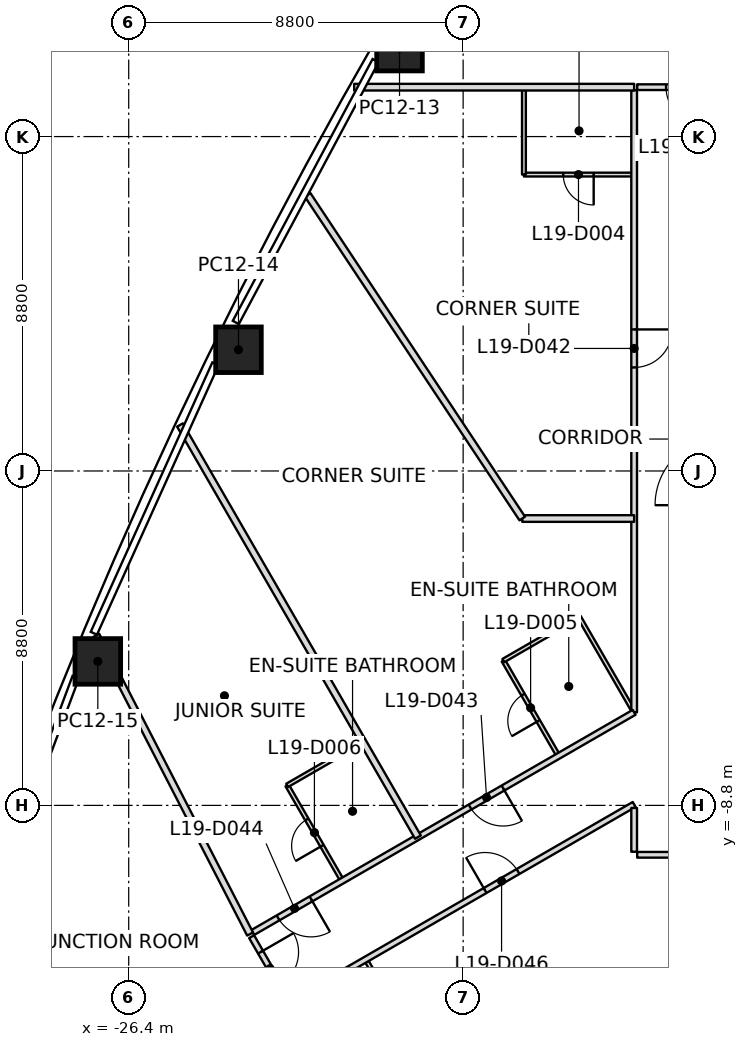
"""IFC4 building model, lengths in metres.
Left out: names, types, materials, properties, quantities, classifications, styles, units other than length and angle.
Written with IfcOpenShell. Run it as: python <this file> out.ifc"""

import sys

from ifc_helpers import new_model, si_unit, direction, frame, frame_2d, origin, origin_2d, place, context, subcontext, project, spatial, rectangle, extrude, element, fill, save


model = new_model("IFC4")
c1 = context("Model", 3, precision=1e-05, world=origin(), true_north=direction((0.0, 1.0)))
c2 = subcontext(c1, "Body", "Model", "MODEL_VIEW")
j1 = project(units=[si_unit("LENGTHUNIT", "METRE"), si_unit("PLANEANGLEUNIT", "RADIAN")], contexts=[c1])
p1 = place(None, origin())
s1 = spatial("IfcSite", under=j1, at=p1, CompositionType="ELEMENT")
p2 = place(p1, origin())
s2 = spatial("IfcBuilding", under=s1, at=p2, CompositionType="ELEMENT")
p3 = place(p2, frame((0.0, 0.0, 92.4)))
s3 = spatial("IfcBuildingStorey", under=s2, at=p3, CompositionType="ELEMENT", Elevation=92.4)
p4 = place(p3, frame((-19.274, 11.128, 0.0), z_axis=(0.010688020009, -0.006201690622, 0.999923649716), x_axis=(0.499971440741, 0.866041891424, 2.7221193e-05)))
e1 = element("IfcColumn", 1, at=p4, inside=s3, PredefinedType="COLUMN", context=c2, shape_type="SweptSolid", body=[
    extrude(rectangle(XDim=1.2, YDim=1.2, at=origin_2d()), origin(), (0.0, 0.0, 1.0), 3.7),
])
p5 = place(p3, frame((-23.512, 3.19, 0.0), z_axis=(0.015305637388, 0.002243067548, 0.999880345898), x_axis=(0.441317903512, 0.897307986586, -0.008768423407)))
e2 = element("IfcColumn", 2, at=p5, inside=s3, PredefinedType="COLUMN", context=c2, shape_type="SweptSolid", body=[
    extrude(rectangle(XDim=1.2, YDim=1.2, at=origin_2d()), origin(), (0.0, 0.0, 1.0), 3.701),
])
p6 = place(p3, frame((-27.212, -5.011, 0.0), z_axis=(0.019393432612, 0.011015997436, 0.999751240345), x_axis=(0.380717970692, 0.924524223098, -0.017572356073)))
e3 = element("IfcColumn", 3, at=p6, inside=s3, PredefinedType="COLUMN", context=c2, shape_type="SweptSolid", body=[
    extrude(rectangle(XDim=1.2, YDim=1.2, at=origin_2d()), origin(), (0.0, 0.0, 1.0), 3.701),
])
p7 = place(p3, frame((-23.206, -12.185, 0.0), z_axis=(0.0, 0.0, 1.0), x_axis=(-0.457776028904, 0.88906754938, 0.0)))
e4 = element("IfcWall", 4, at=p7, inside=s3, PredefinedType="PARTITIONING", context=c2, shape_type="SweptSolid", body=[
    extrude(rectangle(XDim=8.84, YDim=0.175, at=frame_2d((4.42, 0.0))), origin(), (0.0, 0.0, 1.0), 3.15),
])
p8 = place(p3, frame((-18.789, -9.635, 0.0), z_axis=(0.0, 0.0, 1.0), x_axis=(-0.500005395086, 0.866022288908, 0.0)))
e5 = element("IfcWall", 5, at=p8, inside=s3, PredefinedType="PARTITIONING", context=c2, shape_type="SweptSolid", body=[
    extrude(rectangle(XDim=12.523, YDim=0.175, at=frame_2d((6.262, 0.0))), origin(), (0.0, 0.0, 1.0), 2.934),
])
p9 = place(p3, frame((-13.1, -1.251, 0.0), z_axis=(0.0, 0.0, 1.0), x_axis=(-1.0, 0.0, 0.0)))
e6 = element("IfcWall", 6, at=p9, inside=s3, PredefinedType="PARTITIONING", context=c2, shape_type="SweptSolid", body=[
    extrude(rectangle(XDim=2.944, YDim=0.175, at=frame_2d((1.472, 0.0))), origin(), (0.0, 0.0, 1.0), 3.15),
])
p10 = place(p3, frame((-16.044, -1.251, 0.0), z_axis=(0.0, 0.0, 1.0), x_axis=(-0.552647734039, 0.833414951907, 0.0)))
e7 = element("IfcWall", 7, at=p10, inside=s3, PredefinedType="PARTITIONING", context=c2, shape_type="SweptSolid", body=[
    extrude(rectangle(XDim=10.22, YDim=0.175, at=frame_2d((5.11, 0.0))), origin(), (0.0, 0.0, 1.0), 2.934),
])
p11 = place(p3, frame((-13.1, 10.1, 0.0), z_axis=(0.0, 0.0, 1.0), x_axis=(-1.0, 0.0, 0.0)))
e8 = element("IfcWall", 8, at=p11, inside=s3, PredefinedType="PARTITIONING", context=c2, shape_type="SweptSolid", body=[
    extrude(rectangle(XDim=7.367, YDim=0.175, at=frame_2d((3.684, 0.0))), origin(), (0.0, 0.0, 1.0), 2.934),
])
p12 = place(p3, frame((-23.166, -12.255, 0.0), z_axis=(0.0, 0.0, 1.0), x_axis=(0.499969367985, -0.866043088465, 0.0)))
e9 = element("IfcWall", 9, at=p12, inside=s3, PredefinedType="PARTITIONING", context=c2, shape_type="SweptSolid", body=[
    extrude(rectangle(XDim=1.94, YDim=0.15, at=frame_2d((0.97, 0.0))), origin(), (0.0, 0.0, 1.0), 2.797),
])
p13 = place(p12, frame((0.47, 0.0, 0.0)))
e10 = element("IfcOpeningElement", 10, at=p13, cuts=e9, PredefinedType="OPENING", context=c2, shape_type="SweptSolid", body=[
    extrude(rectangle(XDim=1.0, YDim=2.1, at=frame_2d((0.5, 1.05))), frame((0.0, 0.075, 0.0), z_axis=(0.0, -1.0, 0.0), x_axis=(1.0, 0.0, 0.0)), (0.0, 0.0, 1.0), 0.15),
])
p14 = place(p3, frame((-13.1, 10.02, 0.0), z_axis=(0.0, 0.0, 1.0), x_axis=(0.0, -1.0, 0.0)))
e11 = element("IfcWall", 11, at=p14, inside=s3, PredefinedType="PARTITIONING", context=c2, shape_type="SweptSolid", body=[
    extrude(rectangle(XDim=16.371, YDim=0.15, at=frame_2d((8.186, 0.0))), origin(), (0.0, 0.0, 1.0), 2.947),
])
p15 = place(p14, frame((6.295, 0.0, 0.0)))
e12 = element("IfcOpeningElement", 12, at=p15, cuts=e11, PredefinedType="OPENING", context=c2, shape_type="SweptSolid", body=[
    extrude(rectangle(XDim=1.0, YDim=2.1, at=frame_2d((0.5, 1.05))), frame((0.0, 0.075, 0.0), z_axis=(0.0, -1.0, 0.0), x_axis=(1.0, 0.0, 0.0)), (0.0, 0.0, 1.0), 0.15),
])
p16 = place(p3, frame((-13.1, -6.351, 0.0), z_axis=(0.0, 0.0, 1.0), x_axis=(-0.866028069402, -0.499995382986, 0.0)))
e13 = element("IfcWall", 13, at=p16, inside=s3, PredefinedType="PARTITIONING", context=c2, shape_type="SweptSolid", body=[
    extrude(rectangle(XDim=11.589, YDim=0.15, at=frame_2d((5.794, 0.0))), origin(), (0.0, 0.0, 1.0), 2.947),
])
p17 = place(p16, frame((3.985, 0.0, 0.0)))
e14 = element("IfcOpeningElement", 14, at=p17, cuts=e13, PredefinedType="OPENING", context=c2, shape_type="SweptSolid", body=[
    extrude(rectangle(XDim=1.0, YDim=2.1, at=frame_2d((0.5, 1.05))), frame((0.0, 0.075, 0.0), z_axis=(0.0, -1.0, 0.0), x_axis=(1.0, 0.0, 0.0)), (0.0, 0.0, 1.0), 0.15),
])
p18 = place(p16, frame((9.819, 0.0, 0.0)))
e15 = element("IfcOpeningElement", 15, at=p18, cuts=e13, PredefinedType="OPENING", context=c2, shape_type="SweptSolid", body=[
    extrude(rectangle(XDim=1.0, YDim=2.1, at=frame_2d((0.5, 1.05))), frame((0.0, 0.075, 0.0), z_axis=(0.0, -1.0, 0.0), x_axis=(1.0, 0.0, 0.0)), (0.0, 0.0, 1.0), 0.15),
])
p19 = place(p3, frame((-22.086, -13.964, 0.0), z_axis=(0.0, 0.0, 1.0), x_axis=(0.866016323255, 0.500015727609, 0.0)))
e16 = element("IfcWall", 16, at=p19, inside=s3, PredefinedType="PARTITIONING", context=c2, shape_type="SweptSolid", body=[
    extrude(rectangle(XDim=10.377, YDim=0.15, at=frame_2d((5.188, 0.0))), origin(), (0.0, 0.0, 1.0), 2.797),
])
p20 = place(p19, frame((5.848, 0.0, 0.0)))
e17 = element("IfcOpeningElement", 17, at=p20, cuts=e16, PredefinedType="OPENING", context=c2, shape_type="SweptSolid", body=[
    extrude(rectangle(XDim=1.0, YDim=2.1, at=frame_2d((0.5, 1.05))), frame((0.0, 0.075, 0.0), z_axis=(0.0, -1.0, 0.0), x_axis=(1.0, 0.0, 0.0)), (0.0, 0.0, 1.0), 0.15),
])
p21 = place(p3, frame((-13.1, -8.867, 0.0), z_axis=(0.0, 0.0, 1.0), x_axis=(0.0, -1.0, 0.0)))
e18 = element("IfcWall", 18, at=p21, inside=s3, PredefinedType="PARTITIONING", context=c2, shape_type="SweptSolid", body=[
    extrude(rectangle(XDim=1.153, YDim=0.15, at=frame_2d((0.576, 0.0))), origin(), (0.0, 0.0, 1.0), 2.797),
])
p22 = place(p3, frame((-13.02, -10.1, 0.0), z_axis=(0.0, 0.0, 1.0), x_axis=(1.0, 0.0, 0.0)))
e19 = element("IfcWall", 19, at=p22, inside=s3, PredefinedType="PARTITIONING", context=c2, shape_type="SweptSolid", body=[
    extrude(rectangle(XDim=26.04, YDim=0.15, at=frame_2d((13.02, 0.0))), origin(), (0.0, 0.0, 1.0), 2.947),
])
p23 = place(p22, frame((5.37, 0.0, 0.0)))
e20 = element("IfcOpeningElement", 20, at=p23, cuts=e19, PredefinedType="OPENING", context=c2, shape_type="SweptSolid", body=[
    extrude(rectangle(XDim=1.0, YDim=2.1, at=frame_2d((0.5, 1.05))), frame((0.0, 0.075, 0.0), z_axis=(0.0, -1.0, 0.0), x_axis=(1.0, 0.0, 0.0)), (0.0, 0.0, 1.0), 0.15),
])
p24 = place(p22, frame((10.17, 0.0, 0.0)))
e21 = element("IfcOpeningElement", 21, at=p24, cuts=e19, PredefinedType="OPENING", context=c2, shape_type="SweptSolid", body=[
    extrude(rectangle(XDim=1.0, YDim=2.1, at=frame_2d((0.5, 1.05))), frame((0.0, 0.075, 0.0), z_axis=(0.0, -1.0, 0.0), x_axis=(1.0, 0.0, 0.0)), (0.0, 0.0, 1.0), 0.15),
])
p25 = place(p22, frame((14.97, 0.0, 0.0)))
e22 = element("IfcOpeningElement", 22, at=p25, cuts=e19, PredefinedType="OPENING", context=c2, shape_type="SweptSolid", body=[
    extrude(rectangle(XDim=1.0, YDim=2.1, at=frame_2d((0.5, 1.05))), frame((0.0, 0.075, 0.0), z_axis=(0.0, -1.0, 0.0), x_axis=(1.0, 0.0, 0.0)), (0.0, 0.0, 1.0), 0.15),
])
p26 = place(p22, frame((19.77, 0.0, 0.0)))
e23 = element("IfcOpeningElement", 23, at=p26, cuts=e19, PredefinedType="OPENING", context=c2, shape_type="SweptSolid", body=[
    extrude(rectangle(XDim=1.0, YDim=2.1, at=frame_2d((0.5, 1.05))), frame((0.0, 0.075, 0.0), z_axis=(0.0, -1.0, 0.0), x_axis=(1.0, 0.0, 0.0)), (0.0, 0.0, 1.0), 0.15),
])
p27 = place(p3, frame((-3.58, 10.1, 0.0), z_axis=(0.0, 0.0, 1.0), x_axis=(-1.0, 0.0, 0.0)))
e24 = element("IfcWall", 24, at=p27, inside=s3, PredefinedType="PARTITIONING", context=c2, shape_type="SweptSolid", body=[
    extrude(rectangle(XDim=9.44, YDim=0.15, at=frame_2d((4.72, 0.0))), origin(), (0.0, 0.0, 1.0), 2.947),
])
p28 = place(p27, frame((7.68, 0.0, 0.0)))
e25 = element("IfcOpeningElement", 25, at=p28, cuts=e24, PredefinedType="OPENING", context=c2, shape_type="SweptSolid", body=[
    extrude(rectangle(XDim=1.0, YDim=2.1, at=frame_2d((0.5, 1.05))), frame((0.0, 0.075, 0.0), z_axis=(0.0, -1.0, 0.0), x_axis=(1.0, 0.0, 0.0)), (0.0, 0.0, 1.0), 0.15),
])
p29 = place(p3, frame((-20.796, -10.76, 0.0), z_axis=(0.0, 0.0, 1.0), x_axis=(-0.499936001555, 0.866062350151, 0.0)))
e26 = element("IfcWall", 26, at=p29, inside=s3, PredefinedType="PARTITIONING", context=c2, shape_type="SweptSolid", body=[
    extrude(rectangle(XDim=2.87, YDim=0.1, at=frame_2d((1.435, 0.0))), origin(), (0.0, 0.0, 1.0), 3.15),
])
p30 = place(p29, frame((1.035, 0.0, 0.0)))
e27 = element("IfcOpeningElement", 27, at=p30, cuts=e26, PredefinedType="OPENING", context=c2, shape_type="SweptSolid", body=[
    extrude(rectangle(XDim=0.8, YDim=2.1, at=frame_2d((0.4, 1.05))), frame((0.0, 0.05, 0.0), z_axis=(0.0, -1.0, 0.0), x_axis=(1.0, 0.0, 0.0)), (0.0, 0.0, 1.0), 0.1),
])
p31 = place(p3, frame((-22.231, -8.274, 0.0), z_axis=(0.0, 0.0, 1.0), x_axis=(0.866017224141, 0.500014167291, 0.0)))
e28 = element("IfcWall", 28, at=p31, inside=s3, PredefinedType="PARTITIONING", context=c2, shape_type="SweptSolid", body=[
    extrude(rectangle(XDim=2.27, YDim=0.1, at=frame_2d((1.135, 0.0))), origin(), (0.0, 0.0, 1.0), 3.15),
])
p32 = place(p3, frame((-20.149, -12.88, 0.0), z_axis=(0.0, 0.0, 1.0), x_axis=(0.499936001555, -0.866062350151, 0.0)))
e29 = element("IfcWall", 29, at=p32, inside=s3, PredefinedType="PARTITIONING", context=c2, shape_type="SweptSolid", body=[
    extrude(rectangle(XDim=2.87, YDim=0.1, at=frame_2d((1.435, 0.0))), origin(), (0.0, 0.0, 1.0), 3.15),
])
p33 = place(p32, frame((1.035, 0.0, 0.0)))
e30 = element("IfcOpeningElement", 30, at=p33, cuts=e29, PredefinedType="OPENING", context=c2, shape_type="SweptSolid", body=[
    extrude(rectangle(XDim=0.8, YDim=2.1, at=frame_2d((0.4, 1.05))), frame((0.0, 0.05, 0.0), z_axis=(0.0, -1.0, 0.0), x_axis=(1.0, 0.0, 0.0)), (0.0, 0.0, 1.0), 0.1),
])
p34 = place(p3, frame((-13.13, 7.8, 0.0), z_axis=(0.0, 0.0, 1.0), x_axis=(-1.0, 0.0, 0.0)))
e31 = element("IfcWall", 31, at=p34, inside=s3, PredefinedType="PARTITIONING", context=c2, shape_type="SweptSolid", body=[
    extrude(rectangle(XDim=2.87, YDim=0.1, at=frame_2d((1.435, 0.0))), origin(), (0.0, 0.0, 1.0), 3.15),
])
p35 = place(p34, frame((1.035, 0.0, 0.0)))
e32 = element("IfcOpeningElement", 32, at=p35, cuts=e31, PredefinedType="OPENING", context=c2, shape_type="SweptSolid", body=[
    extrude(rectangle(XDim=0.8, YDim=2.1, at=frame_2d((0.4, 1.05))), frame((0.0, 0.05, 0.0), z_axis=(0.0, -1.0, 0.0), x_axis=(1.0, 0.0, 0.0)), (0.0, 0.0, 1.0), 0.1),
])
p36 = place(p3, frame((-16.0, 7.8, 0.0), z_axis=(0.0, 0.0, 1.0), x_axis=(0.0, 1.0, 0.0)))
e33 = element("IfcWall", 33, at=p36, inside=s3, PredefinedType="PARTITIONING", context=c2, shape_type="SweptSolid", body=[
    extrude(rectangle(XDim=2.27, YDim=0.1, at=frame_2d((1.135, 0.0))), origin(), (0.0, 0.0, 1.0), 3.15),
])
p37 = place(p3, frame((-15.107, -7.475, 0.0), z_axis=(0.0, 0.0, 1.0), x_axis=(-0.500036638401, 0.866004249561, 0.0)))
e34 = element("IfcWall", 34, at=p37, inside=s3, PredefinedType="PARTITIONING", context=c2, shape_type="SweptSolid", body=[
    extrude(rectangle(XDim=2.87, YDim=0.1, at=frame_2d((1.435, 0.0))), origin(), (0.0, 0.0, 1.0), 3.15),
])
p38 = place(p37, frame((1.035, 0.0, 0.0)))
e35 = element("IfcOpeningElement", 35, at=p38, cuts=e34, PredefinedType="OPENING", context=c2, shape_type="SweptSolid", body=[
    extrude(rectangle(XDim=0.8, YDim=2.1, at=frame_2d((0.4, 1.05))), frame((0.0, 0.05, 0.0), z_axis=(0.0, -1.0, 0.0), x_axis=(1.0, 0.0, 0.0)), (0.0, 0.0, 1.0), 0.1),
])
p39 = place(p3, frame((-16.542, -4.99, 0.0), z_axis=(0.0, 0.0, 1.0), x_axis=(0.866007057882, 0.500031774688, 0.0)))
e36 = element("IfcWall", 36, at=p39, inside=s3, PredefinedType="PARTITIONING", context=c2, shape_type="SweptSolid", body=[
    extrude(rectangle(XDim=2.3, YDim=0.1, at=frame_2d((1.15, 0.0))), origin(), (0.0, 0.0, 1.0), 2.947),
])
p40 = place(p3, frame((-14.55, -3.839, 0.0), z_axis=(0.0, 0.0, 1.0), x_axis=(0.500049861556, -0.865996614288, 0.0)))
e37 = element("IfcWall", 37, at=p40, inside=s3, PredefinedType="PARTITIONING", context=c2, shape_type="SweptSolid", body=[
    extrude(rectangle(XDim=2.84, YDim=0.1, at=frame_2d((1.42, 0.0))), origin(), (0.0, 0.0, 1.0), 2.947),
])
p41 = place(p28, origin())
e38 = element("IfcDoor", 38, at=p41, inside=s3, OperationType="SINGLE_SWING_RIGHT", PredefinedType="DOOR", context=c2, shape_type="SweptSolid", body=[
    extrude(rectangle(XDim=1.0, YDim=2.1, at=frame_2d((0.5, 1.05))), frame((0.0, 0.025, 0.0), z_axis=(0.0, -1.0, 0.0), x_axis=(1.0, 0.0, 0.0)), (0.0, 0.0, 1.0), 0.05),
])
fill(e25, e38)
p42 = place(p15, origin())
e39 = element("IfcDoor", 39, at=p42, inside=s3, OperationType="SINGLE_SWING_LEFT", PredefinedType="DOOR", context=c2, shape_type="SweptSolid", body=[
    extrude(rectangle(XDim=1.0, YDim=2.1, at=frame_2d((0.5, 1.05))), frame((0.0, 0.025, 0.0), z_axis=(0.0, -1.0, 0.0), x_axis=(1.0, 0.0, 0.0)), (0.0, 0.0, 1.0), 0.05),
])
fill(e12, e39)
p43 = place(p35, origin())
e40 = element("IfcDoor", 40, at=p43, inside=s3, OperationType="SINGLE_SWING_RIGHT", PredefinedType="DOOR", context=c2, shape_type="SweptSolid", body=[
    extrude(rectangle(XDim=0.8, YDim=2.1, at=frame_2d((0.4, 1.05))), frame((0.0, 0.025, 0.0), z_axis=(0.0, -1.0, 0.0), x_axis=(1.0, 0.0, 0.0)), (0.0, 0.0, 1.0), 0.05),
])
fill(e32, e40)
p44 = place(p17, origin())
e41 = element("IfcDoor", 41, at=p44, inside=s3, OperationType="SINGLE_SWING_LEFT", PredefinedType="DOOR", context=c2, shape_type="SweptSolid", body=[
    extrude(rectangle(XDim=1.0, YDim=2.1, at=frame_2d((0.5, 1.05))), frame((0.0, 0.025, 0.0), z_axis=(0.0, -1.0, 0.0), x_axis=(1.0, 0.0, 0.0)), (0.0, 0.0, 1.0), 0.05),
])
fill(e14, e41)
p45 = place(p38, origin())
e42 = element("IfcDoor", 42, at=p45, inside=s3, OperationType="SINGLE_SWING_RIGHT", PredefinedType="DOOR", context=c2, shape_type="SweptSolid", body=[
    extrude(rectangle(XDim=0.8, YDim=2.1, at=frame_2d((0.4, 1.05))), frame((0.0, 0.025, 0.0), z_axis=(0.0, -1.0, 0.0), x_axis=(1.0, 0.0, 0.0)), (0.0, 0.0, 1.0), 0.05),
])
fill(e35, e42)
p46 = place(p18, origin())
e43 = element("IfcDoor", 43, at=p46, inside=s3, OperationType="SINGLE_SWING_LEFT", PredefinedType="DOOR", context=c2, shape_type="SweptSolid", body=[
    extrude(rectangle(XDim=1.0, YDim=2.1, at=frame_2d((0.5, 1.05))), frame((0.0, 0.025, 0.0), z_axis=(0.0, -1.0, 0.0), x_axis=(1.0, 0.0, 0.0)), (0.0, 0.0, 1.0), 0.05),
])
fill(e15, e43)
p47 = place(p30, origin())
e44 = element("IfcDoor", 44, at=p47, inside=s3, OperationType="SINGLE_SWING_LEFT", PredefinedType="DOOR", context=c2, shape_type="SweptSolid", body=[
    extrude(rectangle(XDim=0.8, YDim=2.1, at=frame_2d((0.4, 1.05))), frame((0.0, 0.025, 0.0), z_axis=(0.0, -1.0, 0.0), x_axis=(1.0, 0.0, 0.0)), (0.0, 0.0, 1.0), 0.05),
])
fill(e27, e44)
p48 = place(p13, origin())
e45 = element("IfcDoor", 45, at=p48, inside=s3, OperationType="SINGLE_SWING_LEFT", PredefinedType="DOOR", context=c2, shape_type="SweptSolid", body=[
    extrude(rectangle(XDim=1.0, YDim=2.1, at=frame_2d((0.5, 1.05))), frame((0.0, 0.025, 0.0), z_axis=(0.0, -1.0, 0.0), x_axis=(1.0, 0.0, 0.0)), (0.0, 0.0, 1.0), 0.05),
])
fill(e10, e45)
p49 = place(p20, origin())
e46 = element("IfcDoor", 46, at=p49, inside=s3, OperationType="SINGLE_SWING_LEFT", PredefinedType="DOOR", context=c2, shape_type="SweptSolid", body=[
    extrude(rectangle(XDim=1.0, YDim=2.1, at=frame_2d((0.5, 1.05))), frame((0.0, 0.025, 0.0), z_axis=(0.0, -1.0, 0.0), x_axis=(1.0, 0.0, 0.0)), (0.0, 0.0, 1.0), 0.05),
])
fill(e17, e46)
save(model, sys.argv[1])
